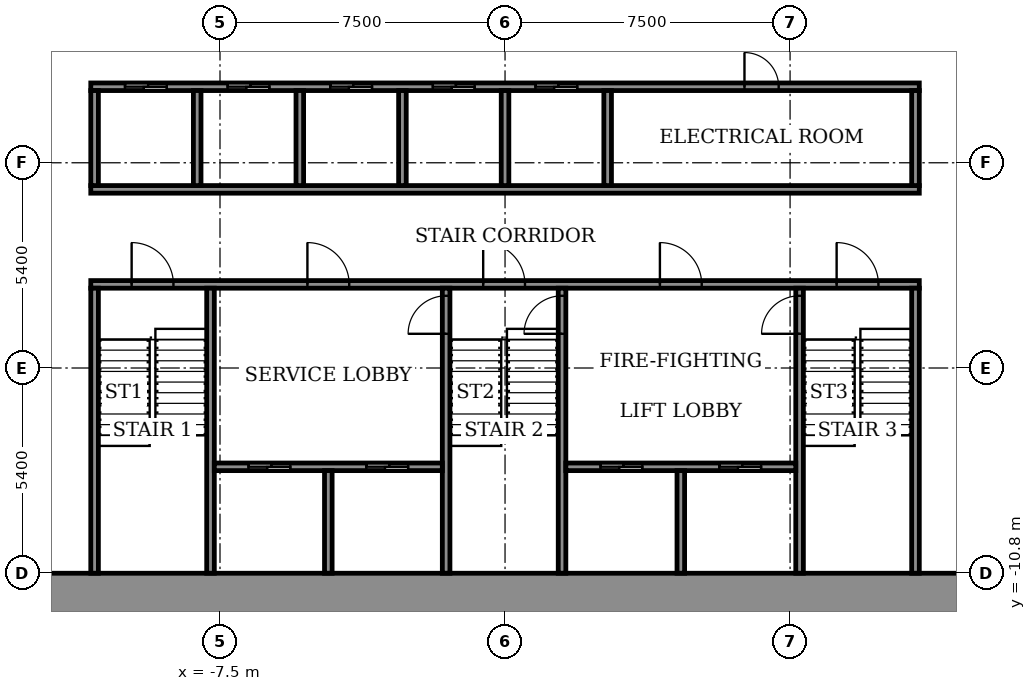
"""IFC4 building model, lengths in metres.
Left out: names, types, materials, properties, quantities, classifications, styles, units other than length and angle.
Written with IfcOpenShell. Run it as: python <this file> out.ifc"""

import sys

from ifc_helpers import new_model, si_unit, direction, frame, frame_2d, origin, place, context, subcontext, project, spatial, rectangle, extrude, element, fill, save


model = new_model("IFC4")
c1 = context("Model", 3, precision=1e-05, world=origin(), true_north=direction((0.0, 1.0)))
c2 = subcontext(c1, "Body", "Model", "MODEL_VIEW")
j1 = project(units=[si_unit("LENGTHUNIT", "METRE"), si_unit("PLANEANGLEUNIT", "RADIAN")], contexts=[c1])
p1 = place(None, origin())
s1 = spatial("IfcSite", under=j1, at=p1, CompositionType="ELEMENT")
p2 = place(p1, origin())
s2 = spatial("IfcBuilding", under=s1, at=p2, CompositionType="ELEMENT")
p3 = place(p2, frame((0.0, 0.0, 44.9)))
s3 = spatial("IfcBuildingStorey", under=s2, at=p3, CompositionType="ELEMENT", Elevation=44.9)
p4 = place(p3, frame((-14.9, -11.35, 0.0), z_axis=(0.0, 0.0, 1.0), x_axis=(1.0, 0.0, 0.0)))
e1 = element("IfcWall", 1, at=p4, inside=s3, PredefinedType="SHEAR", context=c2, shape_type="SweptSolid", body=[
    extrude(rectangle(XDim=29.8, YDim=1.1, at=frame_2d((14.9, 0.0))), origin(), (0.0, 0.0, 1.0), 3.6),
])
p5 = place(p3, frame((-10.9, -3.2, 0.0), z_axis=(0.0, 0.0, 1.0), x_axis=(1.0, 0.0, 0.0)))
e2 = element("IfcWall", 2, at=p5, inside=s3, PredefinedType="SHEAR", context=c2, shape_type="SweptSolid", body=[
    extrude(rectangle(XDim=21.8, YDim=0.2, at=frame_2d((10.9, 0.0))), origin(), (0.0, 0.0, 1.0), 3.05),
])
p6 = place(p5, frame((1.075, 0.0, 0.0)))
e3 = element("IfcOpeningElement", 3, at=p6, cuts=e2, PredefinedType="OPENING", context=c2, shape_type="SweptSolid", body=[
    extrude(rectangle(XDim=1.1, YDim=2.1, at=frame_2d((0.55, 1.05))), frame((0.0, 0.11, 0.0), z_axis=(0.0, -1.0, 0.0), x_axis=(1.0, 0.0, 0.0)), (0.0, 0.0, 1.0), 0.22),
])
p7 = place(p5, frame((10.325, 0.0, 0.0)))
e4 = element("IfcOpeningElement", 4, at=p7, cuts=e2, PredefinedType="OPENING", context=c2, shape_type="SweptSolid", body=[
    extrude(rectangle(XDim=1.1, YDim=2.1, at=frame_2d((0.55, 1.05))), frame((0.0, 0.11, 0.0), z_axis=(0.0, -1.0, 0.0), x_axis=(1.0, 0.0, 0.0)), (0.0, 0.0, 1.0), 0.22),
])
p8 = place(p5, frame((19.625, 0.0, 0.0)))
e5 = element("IfcOpeningElement", 5, at=p8, cuts=e2, PredefinedType="OPENING", context=c2, shape_type="SweptSolid", body=[
    extrude(rectangle(XDim=1.1, YDim=2.1, at=frame_2d((0.55, 1.05))), frame((0.0, 0.11, 0.0), z_axis=(0.0, -1.0, 0.0), x_axis=(1.0, 0.0, 0.0)), (0.0, 0.0, 1.0), 0.22),
])
p9 = place(p5, frame((5.7, 0.0, 0.0)))
e6 = element("IfcOpeningElement", 6, at=p9, cuts=e2, PredefinedType="OPENING", context=c2, shape_type="SweptSolid", body=[
    extrude(rectangle(XDim=1.1, YDim=2.1, at=frame_2d((0.55, 1.05))), frame((0.0, 0.11, 0.0), z_axis=(0.0, -1.0, 0.0), x_axis=(1.0, 0.0, 0.0)), (0.0, 0.0, 1.0), 0.22),
])
p10 = place(p5, frame((14.975, 0.0, 0.0)))
e7 = element("IfcOpeningElement", 7, at=p10, cuts=e2, PredefinedType="OPENING", context=c2, shape_type="SweptSolid", body=[
    extrude(rectangle(XDim=1.1, YDim=2.1, at=frame_2d((0.55, 1.05))), frame((0.0, 0.11, 0.0), z_axis=(0.0, -1.0, 0.0), x_axis=(1.0, 0.0, 0.0)), (0.0, 0.0, 1.0), 0.22),
])
p11 = place(p3, frame((-10.9, -0.7, 0.0), z_axis=(0.0, 0.0, 1.0), x_axis=(1.0, 0.0, 0.0)))
e8 = element("IfcWall", 8, at=p11, inside=s3, PredefinedType="SHEAR", context=c2, shape_type="SweptSolid", body=[
    extrude(rectangle(XDim=21.8, YDim=0.2, at=frame_2d((10.9, 0.0))), origin(), (0.0, 0.0, 1.0), 3.05),
])
p12 = place(p3, frame((-10.9, 2.0, 0.0), z_axis=(0.0, 0.0, 1.0), x_axis=(1.0, 0.0, 0.0)))
e9 = element("IfcWall", 9, at=p12, inside=s3, PredefinedType="SHEAR", context=c2, shape_type="SweptSolid", body=[
    extrude(rectangle(XDim=21.8, YDim=0.2, at=frame_2d((10.9, 0.0))), origin(), (0.0, 0.0, 1.0), 3.05),
])
p13 = place(p12, frame((0.9, 0.0, 0.0)))
e10 = element("IfcOpeningElement", 10, at=p13, cuts=e9, PredefinedType="OPENING", context=c2, shape_type="SweptSolid", body=[
    extrude(rectangle(XDim=1.1, YDim=2.1, at=frame_2d((0.55, 1.05))), frame((0.0, 0.11, 0.0), z_axis=(0.0, -1.0, 0.0), x_axis=(1.0, 0.0, 0.0)), (0.0, 0.0, 1.0), 0.22),
])
p14 = place(p12, frame((3.6, 0.0, 0.0)))
e11 = element("IfcOpeningElement", 11, at=p14, cuts=e9, PredefinedType="OPENING", context=c2, shape_type="SweptSolid", body=[
    extrude(rectangle(XDim=1.1, YDim=2.1, at=frame_2d((0.55, 1.05))), frame((0.0, 0.11, 0.0), z_axis=(0.0, -1.0, 0.0), x_axis=(1.0, 0.0, 0.0)), (0.0, 0.0, 1.0), 0.22),
])
p15 = place(p12, frame((6.3, 0.0, 0.0)))
e12 = element("IfcOpeningElement", 12, at=p15, cuts=e9, PredefinedType="OPENING", context=c2, shape_type="SweptSolid", body=[
    extrude(rectangle(XDim=1.1, YDim=2.1, at=frame_2d((0.55, 1.05))), frame((0.0, 0.11, 0.0), z_axis=(0.0, -1.0, 0.0), x_axis=(1.0, 0.0, 0.0)), (0.0, 0.0, 1.0), 0.22),
])
p16 = place(p12, frame((9.0, 0.0, 0.0)))
e13 = element("IfcOpeningElement", 13, at=p16, cuts=e9, PredefinedType="OPENING", context=c2, shape_type="SweptSolid", body=[
    extrude(rectangle(XDim=1.1, YDim=2.1, at=frame_2d((0.55, 1.05))), frame((0.0, 0.11, 0.0), z_axis=(0.0, -1.0, 0.0), x_axis=(1.0, 0.0, 0.0)), (0.0, 0.0, 1.0), 0.22),
])
p17 = place(p12, frame((11.7, 0.0, 0.0)))
e14 = element("IfcOpeningElement", 14, at=p17, cuts=e9, PredefinedType="OPENING", context=c2, shape_type="SweptSolid", body=[
    extrude(rectangle(XDim=1.1, YDim=2.1, at=frame_2d((0.55, 1.05))), frame((0.0, 0.11, 0.0), z_axis=(0.0, -1.0, 0.0), x_axis=(1.0, 0.0, 0.0)), (0.0, 0.0, 1.0), 0.22),
])
p18 = place(p12, frame((17.2, 0.0, 0.0)))
e15 = element("IfcOpeningElement", 15, at=p18, cuts=e9, PredefinedType="OPENING", context=c2, shape_type="SweptSolid", body=[
    extrude(rectangle(XDim=0.9, YDim=2.1, at=frame_2d((0.45, 1.05))), frame((0.0, 0.11, 0.0), z_axis=(0.0, -1.0, 0.0), x_axis=(1.0, 0.0, 0.0)), (0.0, 0.0, 1.0), 0.22),
])
for number, where, z_axis, x_axis in (
    (16, (-10.8, -10.8, 0.0), (0.0, 0.0, 1.0), (0.0, 1.0, 0.0)),
    (17, (-7.75, -10.8, 0.0), (0.0, 0.0, 1.0), (0.0, 1.0, 0.0)),
):
    element("IfcWall", number, at=place(p3, frame(where, z_axis=z_axis, x_axis=x_axis)), inside=s3, PredefinedType="SHEAR", context=c2, shape_type="SweptSolid", body=[
        extrude(rectangle(XDim=7.5, YDim=0.2, at=frame_2d((3.75, 0.0))), origin(), (0.0, 0.0, 1.0), 3.05),
    ])
p19 = place(p3, frame((-1.55, -10.8, 0.0), z_axis=(0.0, 0.0, 1.0), x_axis=(0.0, 1.0, 0.0)))
e18 = element("IfcWall", 18, at=p19, inside=s3, PredefinedType="SHEAR", context=c2, shape_type="SweptSolid", body=[
    extrude(rectangle(XDim=7.5, YDim=0.2, at=frame_2d((3.75, 0.0))), origin(), (0.0, 0.0, 1.0), 3.05),
])
p20 = place(p19, frame((6.3, 0.0, 0.0)))
e19 = element("IfcOpeningElement", 19, at=p20, cuts=e18, PredefinedType="OPENING", context=c2, shape_type="SweptSolid", body=[
    extrude(rectangle(XDim=1.0, YDim=2.1, at=frame_2d((0.5, 1.05))), frame((0.0, 0.11, 0.0), z_axis=(0.0, -1.0, 0.0), x_axis=(1.0, 0.0, 0.0)), (0.0, 0.0, 1.0), 0.22),
])
p21 = place(p3, frame((1.5, -10.8, 0.0), z_axis=(0.0, 0.0, 1.0), x_axis=(0.0, 1.0, 0.0)))
e20 = element("IfcWall", 20, at=p21, inside=s3, PredefinedType="SHEAR", context=c2, shape_type="SweptSolid", body=[
    extrude(rectangle(XDim=7.5, YDim=0.2, at=frame_2d((3.75, 0.0))), origin(), (0.0, 0.0, 1.0), 3.05),
])
p22 = place(p21, frame((6.3, 0.0, 0.0)))
e21 = element("IfcOpeningElement", 21, at=p22, cuts=e20, PredefinedType="OPENING", context=c2, shape_type="SweptSolid", body=[
    extrude(rectangle(XDim=1.0, YDim=2.1, at=frame_2d((0.5, 1.05))), frame((0.0, 0.11, 0.0), z_axis=(0.0, -1.0, 0.0), x_axis=(1.0, 0.0, 0.0)), (0.0, 0.0, 1.0), 0.22),
])
p23 = place(p3, frame((7.75, -10.8, 0.0), z_axis=(0.0, 0.0, 1.0), x_axis=(0.0, 1.0, 0.0)))
e22 = element("IfcWall", 22, at=p23, inside=s3, PredefinedType="SHEAR", context=c2, shape_type="SweptSolid", body=[
    extrude(rectangle(XDim=7.5, YDim=0.2, at=frame_2d((3.75, 0.0))), origin(), (0.0, 0.0, 1.0), 3.05),
])
p24 = place(p23, frame((6.3, 0.0, 0.0)))
e23 = element("IfcOpeningElement", 23, at=p24, cuts=e22, PredefinedType="OPENING", context=c2, shape_type="SweptSolid", body=[
    extrude(rectangle(XDim=1.0, YDim=2.1, at=frame_2d((0.5, 1.05))), frame((0.0, 0.11, 0.0), z_axis=(0.0, -1.0, 0.0), x_axis=(1.0, 0.0, 0.0)), (0.0, 0.0, 1.0), 0.22),
])
p25 = place(p3, frame((10.8, -10.8, 0.0), z_axis=(0.0, 0.0, 1.0), x_axis=(0.0, 1.0, 0.0)))
e24 = element("IfcWall", 24, at=p25, inside=s3, PredefinedType="SHEAR", context=c2, shape_type="SweptSolid", body=[
    extrude(rectangle(XDim=7.5, YDim=0.2, at=frame_2d((3.75, 0.0))), origin(), (0.0, 0.0, 1.0), 3.05),
])
p26 = place(p3, frame((-7.65, -8.0, 0.0), z_axis=(0.0, 0.0, 1.0), x_axis=(1.0, 0.0, 0.0)))
e25 = element("IfcWall", 25, at=p26, inside=s3, PredefinedType="SHEAR", context=c2, shape_type="SweptSolid", body=[
    extrude(rectangle(XDim=6.0, YDim=0.2, at=frame_2d((3.0, 0.0))), origin(), (0.0, 0.0, 1.0), 3.05),
])
p27 = place(p26, frame((0.9, 0.0, 0.0)))
e26 = element("IfcOpeningElement", 26, at=p27, cuts=e25, PredefinedType="OPENING", context=c2, shape_type="SweptSolid", body=[
    extrude(rectangle(XDim=1.1, YDim=2.1, at=frame_2d((0.55, 1.05))), frame((0.0, 0.11, 0.0), z_axis=(0.0, -1.0, 0.0), x_axis=(1.0, 0.0, 0.0)), (0.0, 0.0, 1.0), 0.22),
])
p28 = place(p26, frame((4.0, 0.0, 0.0)))
e27 = element("IfcOpeningElement", 27, at=p28, cuts=e25, PredefinedType="OPENING", context=c2, shape_type="SweptSolid", body=[
    extrude(rectangle(XDim=1.1, YDim=2.1, at=frame_2d((0.55, 1.05))), frame((0.0, 0.11, 0.0), z_axis=(0.0, -1.0, 0.0), x_axis=(1.0, 0.0, 0.0)), (0.0, 0.0, 1.0), 0.22),
])
p29 = place(p3, frame((-4.65, -10.8, 0.0), z_axis=(0.0, 0.0, 1.0), x_axis=(0.0, 1.0, 0.0)))
e28 = element("IfcWall", 28, at=p29, inside=s3, PredefinedType="SHEAR", context=c2, shape_type="SweptSolid", body=[
    extrude(rectangle(XDim=2.7, YDim=0.2, at=frame_2d((1.35, 0.0))), origin(), (0.0, 0.0, 1.0), 3.05),
])
p30 = place(p3, frame((1.6, -8.0, 0.0), z_axis=(0.0, 0.0, 1.0), x_axis=(1.0, 0.0, 0.0)))
e29 = element("IfcWall", 29, at=p30, inside=s3, PredefinedType="SHEAR", context=c2, shape_type="SweptSolid", body=[
    extrude(rectangle(XDim=6.05, YDim=0.2, at=frame_2d((3.025, 0.0))), origin(), (0.0, 0.0, 1.0), 3.05),
])
p31 = place(p30, frame((0.913, 0.0, 0.0)))
e30 = element("IfcOpeningElement", 30, at=p31, cuts=e29, PredefinedType="OPENING", context=c2, shape_type="SweptSolid", body=[
    extrude(rectangle(XDim=1.1, YDim=2.1, at=frame_2d((0.55, 1.05))), frame((0.0, 0.11, 0.0), z_axis=(0.0, -1.0, 0.0), x_axis=(1.0, 0.0, 0.0)), (0.0, 0.0, 1.0), 0.22),
])
p32 = place(p30, frame((4.038, 0.0, 0.0)))
e31 = element("IfcOpeningElement", 31, at=p32, cuts=e29, PredefinedType="OPENING", context=c2, shape_type="SweptSolid", body=[
    extrude(rectangle(XDim=1.1, YDim=2.1, at=frame_2d((0.55, 1.05))), frame((0.0, 0.11, 0.0), z_axis=(0.0, -1.0, 0.0), x_axis=(1.0, 0.0, 0.0)), (0.0, 0.0, 1.0), 0.22),
])
p33 = place(p3, frame((4.625, -10.8, 0.0), z_axis=(0.0, 0.0, 1.0), x_axis=(0.0, 1.0, 0.0)))
e32 = element("IfcWall", 32, at=p33, inside=s3, PredefinedType="SHEAR", context=c2, shape_type="SweptSolid", body=[
    extrude(rectangle(XDim=2.7, YDim=0.2, at=frame_2d((1.35, 0.0))), origin(), (0.0, 0.0, 1.0), 3.05),
])
for number, where, z_axis, x_axis in (
    (33, (-10.8, -0.6, 0.0), (0.0, 0.0, 1.0), (0.0, 1.0, 0.0)),
    (34, (-8.1, -0.6, 0.0), (0.0, 0.0, 1.0), (0.0, 1.0, 0.0)),
    (35, (-5.4, -0.6, 0.0), (0.0, 0.0, 1.0), (0.0, 1.0, 0.0)),
    (36, (-2.7, -0.6, 0.0), (0.0, 0.0, 1.0), (0.0, 1.0, 0.0)),
    (37, (0.0, -0.6, 0.0), (0.0, 0.0, 1.0), (0.0, 1.0, 0.0)),
    (38, (2.7, -0.6, 0.0), (0.0, 0.0, 1.0), (0.0, 1.0, 0.0)),
):
    element("IfcWall", number, at=place(p3, frame(where, z_axis=z_axis, x_axis=x_axis)), inside=s3, PredefinedType="SHEAR", context=c2, shape_type="SweptSolid", body=[
        extrude(rectangle(XDim=2.5, YDim=0.2, at=frame_2d((1.25, 0.0))), origin(), (0.0, 0.0, 1.0), 3.05),
    ])
p34 = place(p3, frame((10.8, -0.6, 0.0), z_axis=(0.0, 0.0, 1.0), x_axis=(0.0, 1.0, 0.0)))
e39 = element("IfcWall", 39, at=p34, inside=s3, PredefinedType="STANDARD", context=c2, shape_type="SweptSolid", body=[
    extrude(rectangle(XDim=2.5, YDim=0.2, at=frame_2d((1.25, 0.0))), origin(), (0.0, 0.0, 1.0), 3.05),
])
p35 = place(p13, origin())
e40 = element("IfcDoor", 40, at=p35, inside=s3, OperationType="SLIDING_TO_LEFT", PredefinedType="DOOR", context=c2, shape_type="SweptSolid", body=[
    extrude(rectangle(XDim=1.1, YDim=2.1, at=frame_2d((0.55, 1.05))), frame((0.0, 0.025, 0.0), z_axis=(0.0, -1.0, 0.0), x_axis=(1.0, 0.0, 0.0)), (0.0, 0.0, 1.0), 0.05),
])
fill(e10, e40)
p36 = place(p14, origin())
e41 = element("IfcDoor", 41, at=p36, inside=s3, OperationType="SLIDING_TO_LEFT", PredefinedType="DOOR", context=c2, shape_type="SweptSolid", body=[
    extrude(rectangle(XDim=1.1, YDim=2.1, at=frame_2d((0.55, 1.05))), frame((0.0, 0.025, 0.0), z_axis=(0.0, -1.0, 0.0), x_axis=(1.0, 0.0, 0.0)), (0.0, 0.0, 1.0), 0.05),
])
fill(e11, e41)
p37 = place(p15, origin())
e42 = element("IfcDoor", 42, at=p37, inside=s3, OperationType="SLIDING_TO_LEFT", PredefinedType="DOOR", context=c2, shape_type="SweptSolid", body=[
    extrude(rectangle(XDim=1.1, YDim=2.1, at=frame_2d((0.55, 1.05))), frame((0.0, 0.025, 0.0), z_axis=(0.0, -1.0, 0.0), x_axis=(1.0, 0.0, 0.0)), (0.0, 0.0, 1.0), 0.05),
])
fill(e12, e42)
p38 = place(p16, origin())
e43 = element("IfcDoor", 43, at=p38, inside=s3, OperationType="SLIDING_TO_LEFT", PredefinedType="DOOR", context=c2, shape_type="SweptSolid", body=[
    extrude(rectangle(XDim=1.1, YDim=2.1, at=frame_2d((0.55, 1.05))), frame((0.0, 0.025, 0.0), z_axis=(0.0, -1.0, 0.0), x_axis=(1.0, 0.0, 0.0)), (0.0, 0.0, 1.0), 0.05),
])
fill(e13, e43)
p39 = place(p17, origin())
e44 = element("IfcDoor", 44, at=p39, inside=s3, OperationType="SLIDING_TO_LEFT", PredefinedType="DOOR", context=c2, shape_type="SweptSolid", body=[
    extrude(rectangle(XDim=1.1, YDim=2.1, at=frame_2d((0.55, 1.05))), frame((0.0, 0.025, 0.0), z_axis=(0.0, -1.0, 0.0), x_axis=(1.0, 0.0, 0.0)), (0.0, 0.0, 1.0), 0.05),
])
fill(e14, e44)
p40 = place(p18, origin())
e45 = element("IfcDoor", 45, at=p40, inside=s3, OperationType="SINGLE_SWING_LEFT", PredefinedType="DOOR", context=c2, shape_type="SweptSolid", body=[
    extrude(rectangle(XDim=0.9, YDim=2.1, at=frame_2d((0.45, 1.05))), frame((0.0, 0.025, 0.0), z_axis=(0.0, -1.0, 0.0), x_axis=(1.0, 0.0, 0.0)), (0.0, 0.0, 1.0), 0.05),
])
fill(e15, e45)
p41 = place(p31, origin())
e46 = element("IfcDoor", 46, at=p41, inside=s3, OperationType="SLIDING_TO_LEFT", PredefinedType="DOOR", context=c2, shape_type="SweptSolid", body=[
    extrude(rectangle(XDim=1.1, YDim=2.1, at=frame_2d((0.55, 1.05))), frame((0.0, 0.025, 0.0), z_axis=(0.0, -1.0, 0.0), x_axis=(1.0, 0.0, 0.0)), (0.0, 0.0, 1.0), 0.05),
])
fill(e30, e46)
p42 = place(p27, origin())
e47 = element("IfcDoor", 47, at=p42, inside=s3, OperationType="SLIDING_TO_LEFT", PredefinedType="DOOR", context=c2, shape_type="SweptSolid", body=[
    extrude(rectangle(XDim=1.1, YDim=2.1, at=frame_2d((0.55, 1.05))), frame((0.0, 0.025, 0.0), z_axis=(0.0, -1.0, 0.0), x_axis=(1.0, 0.0, 0.0)), (0.0, 0.0, 1.0), 0.05),
])
fill(e26, e47)
p43 = place(p32, origin())
e48 = element("IfcDoor", 48, at=p43, inside=s3, OperationType="SLIDING_TO_LEFT", PredefinedType="DOOR", context=c2, shape_type="SweptSolid", body=[
    extrude(rectangle(XDim=1.1, YDim=2.1, at=frame_2d((0.55, 1.05))), frame((0.0, 0.025, 0.0), z_axis=(0.0, -1.0, 0.0), x_axis=(1.0, 0.0, 0.0)), (0.0, 0.0, 1.0), 0.05),
])
fill(e31, e48)
p44 = place(p28, origin())
e49 = element("IfcDoor", 49, at=p44, inside=s3, OperationType="SLIDING_TO_LEFT", PredefinedType="DOOR", context=c2, shape_type="SweptSolid", body=[
    extrude(rectangle(XDim=1.1, YDim=2.1, at=frame_2d((0.55, 1.05))), frame((0.0, 0.025, 0.0), z_axis=(0.0, -1.0, 0.0), x_axis=(1.0, 0.0, 0.0)), (0.0, 0.0, 1.0), 0.05),
])
fill(e27, e49)
p45 = place(p6, origin())
e50 = element("IfcDoor", 50, at=p45, inside=s3, OperationType="SINGLE_SWING_RIGHT", PredefinedType="DOOR", context=c2, shape_type="SweptSolid", body=[
    extrude(rectangle(XDim=1.1, YDim=2.1, at=frame_2d((0.55, 1.05))), frame((0.0, 0.025, 0.0), z_axis=(0.0, -1.0, 0.0), x_axis=(1.0, 0.0, 0.0)), (0.0, 0.0, 1.0), 0.05),
])
fill(e3, e50)
p46 = place(p7, origin())
e51 = element("IfcDoor", 51, at=p46, inside=s3, OperationType="SINGLE_SWING_RIGHT", PredefinedType="DOOR", context=c2, shape_type="SweptSolid", body=[
    extrude(rectangle(XDim=1.1, YDim=2.1, at=frame_2d((0.55, 1.05))), frame((0.0, 0.025, 0.0), z_axis=(0.0, -1.0, 0.0), x_axis=(1.0, 0.0, 0.0)), (0.0, 0.0, 1.0), 0.05),
])
fill(e4, e51)
p47 = place(p8, origin())
e52 = element("IfcDoor", 52, at=p47, inside=s3, OperationType="SINGLE_SWING_RIGHT", PredefinedType="DOOR", context=c2, shape_type="SweptSolid", body=[
    extrude(rectangle(XDim=1.1, YDim=2.1, at=frame_2d((0.55, 1.05))), frame((0.0, 0.025, 0.0), z_axis=(0.0, -1.0, 0.0), x_axis=(1.0, 0.0, 0.0)), (0.0, 0.0, 1.0), 0.05),
])
fill(e5, e52)
p48 = place(p9, origin())
e53 = element("IfcDoor", 53, at=p48, inside=s3, OperationType="SINGLE_SWING_LEFT", PredefinedType="DOOR", context=c2, shape_type="SweptSolid", body=[
    extrude(rectangle(XDim=1.1, YDim=2.1, at=frame_2d((0.55, 1.05))), frame((0.0, 0.025, 0.0), z_axis=(0.0, -1.0, 0.0), x_axis=(1.0, 0.0, 0.0)), (0.0, 0.0, 1.0), 0.05),
])
fill(e6, e53)
p49 = place(p10, origin())
e54 = element("IfcDoor", 54, at=p49, inside=s3, OperationType="SINGLE_SWING_LEFT", PredefinedType="DOOR", context=c2, shape_type="SweptSolid", body=[
    extrude(rectangle(XDim=1.1, YDim=2.1, at=frame_2d((0.55, 1.05))), frame((0.0, 0.025, 0.0), z_axis=(0.0, -1.0, 0.0), x_axis=(1.0, 0.0, 0.0)), (0.0, 0.0, 1.0), 0.05),
])
fill(e7, e54)
p50 = place(p20, origin())
e55 = element("IfcDoor", 55, at=p50, inside=s3, OperationType="SINGLE_SWING_RIGHT", PredefinedType="DOOR", context=c2, shape_type="SweptSolid", body=[
    extrude(rectangle(XDim=1.0, YDim=2.1, at=frame_2d((0.5, 1.05))), frame((0.0, 0.025, 0.0), z_axis=(0.0, -1.0, 0.0), x_axis=(1.0, 0.0, 0.0)), (0.0, 0.0, 1.0), 0.05),
])
fill(e19, e55)
p51 = place(p22, origin())
e56 = element("IfcDoor", 56, at=p51, inside=s3, OperationType="SINGLE_SWING_RIGHT", PredefinedType="DOOR", context=c2, shape_type="SweptSolid", body=[
    extrude(rectangle(XDim=1.0, YDim=2.1, at=frame_2d((0.5, 1.05))), frame((0.0, 0.025, 0.0), z_axis=(0.0, -1.0, 0.0), x_axis=(1.0, 0.0, 0.0)), (0.0, 0.0, 1.0), 0.05),
])
fill(e21, e56)
p52 = place(p24, origin())
e57 = element("IfcDoor", 57, at=p52, inside=s3, OperationType="SINGLE_SWING_RIGHT", PredefinedType="DOOR", context=c2, shape_type="SweptSolid", body=[
    extrude(rectangle(XDim=1.0, YDim=2.1, at=frame_2d((0.5, 1.05))), frame((0.0, 0.025, 0.0), z_axis=(0.0, -1.0, 0.0), x_axis=(1.0, 0.0, 0.0)), (0.0, 0.0, 1.0), 0.05),
])
fill(e23, e57)
save(model, sys.argv[1])
